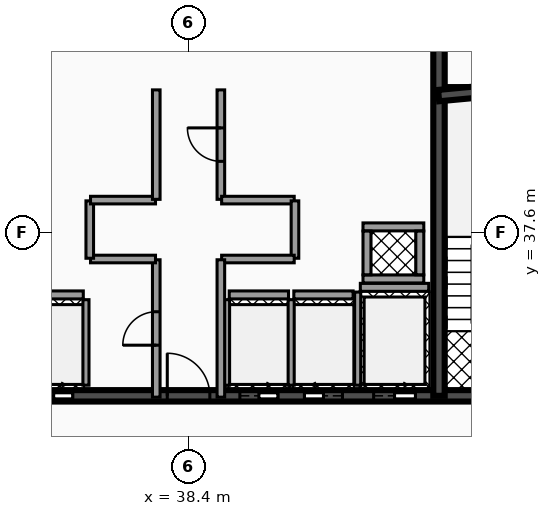
"""IFC4 building model, lengths in metres.
Left out: names, types, materials, properties, quantities, classifications, styles, units other than length and angle.
Written with IfcOpenShell. Run it as: python <this file> out.ifc"""

import sys

from ifc_helpers import new_model, si_unit, direction, frame, frame_2d, origin, place, context, subcontext, project, spatial, rectangle, extrude, element, fill, save


model = new_model("IFC4")
c1 = context("Model", 3, precision=1e-05, world=origin(), true_north=direction((0.0, 1.0)))
c2 = subcontext(c1, "Body", "Model", "MODEL_VIEW")
j1 = project(units=[si_unit("LENGTHUNIT", "METRE"), si_unit("PLANEANGLEUNIT", "RADIAN")], contexts=[c1])
p1 = place(None, origin())
s1 = spatial("IfcSite", under=j1, at=p1, CompositionType="ELEMENT")
p2 = place(p1, origin())
s2 = spatial("IfcBuilding", under=s1, at=p2, CompositionType="ELEMENT")
p3 = place(p2, frame((0.0, 0.0, 272.0)))
s3 = spatial("IfcBuildingStorey", under=s2, at=p3, CompositionType="ELEMENT", Elevation=272.0)
p4 = place(p3, frame((28.5, 33.3, 0.0), z_axis=(0.0, 0.0, 1.0), x_axis=(1.0, 0.0, 0.0)))
e1 = element("IfcWall", 1, at=p4, inside=s3, PredefinedType="SHEAR", context=c2, shape_type="SweptSolid", body=[
    extrude(rectangle(XDim=19.86, YDim=0.3, at=frame_2d((9.93, 0.0))), origin(), (0.0, 0.0, 1.0), 3.18),
])
p5 = place(p4, frame((3.93, 0.0, 0.0)))
e2 = element("IfcOpeningElement", 2, at=p5, cuts=e1, PredefinedType="OPENING", context=c2, shape_type="SweptSolid", body=[
    extrude(rectangle(XDim=1.1, YDim=2.15, at=frame_2d((0.55, 1.075))), frame((0.0, 0.16, 0.0), z_axis=(0.0, -1.0, 0.0), x_axis=(1.0, 0.0, 0.0)), (0.0, 0.0, 1.0), 0.32),
])
p6 = place(p4, frame((14.77, 0.0, 0.0)))
e3 = element("IfcOpeningElement", 3, at=p6, cuts=e1, PredefinedType="OPENING", context=c2, shape_type="SweptSolid", body=[
    extrude(rectangle(XDim=1.1, YDim=2.15, at=frame_2d((0.55, 1.075))), frame((0.0, 0.16, 0.0), z_axis=(0.0, -1.0, 0.0), x_axis=(1.0, 0.0, 0.0)), (0.0, 0.0, 1.0), 0.32),
])
p7 = place(p4, frame((11.25, 0.0, 0.0)))
e4 = element("IfcOpeningElement", 4, at=p7, cuts=e1, PredefinedType="OPENING", context=c2, shape_type="SweptSolid", body=[
    extrude(rectangle(XDim=1.0, YDim=2.1, at=frame_2d((0.5, 1.05))), frame((0.0, 0.16, 0.0), z_axis=(0.0, -1.0, 0.0), x_axis=(1.0, 0.0, 0.0)), (0.0, 0.0, 1.0), 0.32),
])
p8 = place(p4, frame((12.95, 0.0, 0.0)))
e5 = element("IfcOpeningElement", 5, at=p8, cuts=e1, PredefinedType="OPENING", context=c2, shape_type="SweptSolid", body=[
    extrude(rectangle(XDim=1.0, YDim=2.1, at=frame_2d((0.5, 1.05))), frame((0.0, 0.16, 0.0), z_axis=(0.0, -1.0, 0.0), x_axis=(1.0, 0.0, 0.0)), (0.0, 0.0, 1.0), 0.32),
])
p9 = place(p4, frame((5.85, 0.0, 0.0)))
e6 = element("IfcOpeningElement", 6, at=p9, cuts=e1, PredefinedType="OPENING", context=c2, shape_type="SweptSolid", body=[
    extrude(rectangle(XDim=1.0, YDim=2.1, at=frame_2d((0.5, 1.05))), frame((0.0, 0.16, 0.0), z_axis=(0.0, -1.0, 0.0), x_axis=(1.0, 0.0, 0.0)), (0.0, 0.0, 1.0), 0.32),
])
p10 = place(p4, frame((1.21, 0.0, 0.0)))
e7 = element("IfcOpeningElement", 7, at=p10, cuts=e1, PredefinedType="OPENING", context=c2, shape_type="SweptSolid", body=[
    extrude(rectangle(XDim=1.1, YDim=2.2, at=frame_2d((0.55, 1.1))), frame((0.0, 0.16, 0.0), z_axis=(0.0, -1.0, 0.0), x_axis=(1.0, 0.0, 0.0)), (0.0, 0.0, 1.0), 0.32),
])
p11 = place(p4, frame((9.34, 0.0, 0.0)))
e8 = element("IfcOpeningElement", 8, at=p11, cuts=e1, PredefinedType="OPENING", context=c2, shape_type="SweptSolid", body=[
    extrude(rectangle(XDim=1.12, YDim=2.05, at=frame_2d((0.56, 1.025))), frame((0.0, 0.16, 0.0), z_axis=(0.0, -1.0, 0.0), x_axis=(1.0, 0.0, 0.0)), (0.0, 0.0, 1.0), 0.32),
])
p12 = place(p4, frame((17.55, 0.0, 0.0)))
e9 = element("IfcOpeningElement", 9, at=p12, cuts=e1, PredefinedType="OPENING", context=c2, shape_type="SweptSolid", body=[
    extrude(rectangle(XDim=1.1, YDim=2.2, at=frame_2d((0.55, 1.1))), frame((0.0, 0.16, 0.0), z_axis=(0.0, -1.0, 0.0), x_axis=(1.0, 0.0, 0.0)), (0.0, 0.0, 1.0), 0.32),
])
p13 = place(p3, frame((44.99, 33.3, 0.0), z_axis=(0.0, 0.0, 1.0), x_axis=(0.0, 1.0, 0.0)))
e10 = element("IfcWall", 10, at=p13, inside=s3, PredefinedType="SHEAR", context=c2, shape_type="SweptSolid", body=[
    extrude(rectangle(XDim=10.1, YDim=0.3, at=frame_2d((5.05, 0.0))), origin(), (0.0, 0.0, 1.0), 3.18),
])
p14 = place(p3, frame((44.98, 41.2, 0.0), z_axis=(0.0, 0.0, 1.0), x_axis=(0.995686468965, 0.09278176286, 0.0)))
e11 = element("IfcWall", 11, at=p14, inside=s3, PredefinedType="SHEAR", context=c2, shape_type="SweptSolid", body=[
    extrude(rectangle(XDim=3.234, YDim=0.3, at=frame_2d((1.617, 0.0))), origin(), (0.0, 0.0, 1.0), 3.18),
])
p15 = place(p3, frame((42.92, 36.155, 0.0), z_axis=(0.0, 0.0, 1.0), x_axis=(1.0, 0.0, 0.0)))
e12 = element("IfcWall", 12, at=p15, inside=s3, PredefinedType="SOLIDWALL", context=c2, shape_type="SweptSolid", body=[
    extrude(rectangle(XDim=1.8, YDim=0.21, at=frame_2d((0.9, 0.0))), origin(), (0.0, 0.0, 1.0), 3.18),
])
p16 = place(p3, frame((42.85, 33.58, 0.0), z_axis=(0.0, 0.0, 1.0), x_axis=(0.0, 1.0, 0.0)))
e13 = element("IfcWall", 13, at=p16, inside=s3, PredefinedType="SOLIDWALL", context=c2, shape_type="SweptSolid", body=[
    extrude(rectangle(XDim=2.45, YDim=0.16, at=frame_2d((1.225, 0.0))), origin(), (0.0, 0.0, 1.0), 3.18),
])
p17 = place(p3, frame((39.47, 35.955, 0.0), z_axis=(0.0, 0.0, 1.0), x_axis=(1.0, 0.0, 0.0)))
e14 = element("IfcWall", 14, at=p17, inside=s3, PredefinedType="SOLIDWALL", context=c2, shape_type="SweptSolid", body=[
    extrude(rectangle(XDim=1.56, YDim=0.21, at=frame_2d((0.78, 0.0))), origin(), (0.0, 0.0, 1.0), 3.18),
])
for number, where, z_axis, x_axis in (
    (15, (39.4, 33.58, 0.0), (0.0, 0.0, 1.0), (0.0, 1.0, 0.0)),
    (16, (41.1, 33.58, 0.0), (0.0, 0.0, 1.0), (0.0, 1.0, 0.0)),
):
    element("IfcWall", number, at=place(p3, frame(where, z_axis=z_axis, x_axis=x_axis)), inside=s3, PredefinedType="SOLIDWALL", context=c2, shape_type="SweptSolid", body=[
        extrude(rectangle(XDim=2.25, YDim=0.16, at=frame_2d((1.125, 0.0))), origin(), (0.0, 0.0, 1.0), 3.18),
    ])
p18 = place(p3, frame((41.17, 35.955, 0.0), z_axis=(0.0, 0.0, 1.0), x_axis=(1.0, 0.0, 0.0)))
e17 = element("IfcWall", 17, at=p18, inside=s3, PredefinedType="SOLIDWALL", context=c2, shape_type="SweptSolid", body=[
    extrude(rectangle(XDim=1.56, YDim=0.21, at=frame_2d((0.78, 0.0))), origin(), (0.0, 0.0, 1.0), 3.18),
])
p19 = place(p3, frame((34.07, 35.955, 0.0), z_axis=(0.0, 0.0, 1.0), x_axis=(1.0, 0.0, 0.0)))
e18 = element("IfcWall", 18, at=p19, inside=s3, PredefinedType="SOLIDWALL", context=c2, shape_type="SweptSolid", body=[
    extrude(rectangle(XDim=1.56, YDim=0.21, at=frame_2d((0.78, 0.0))), origin(), (0.0, 0.0, 1.0), 3.18),
])
p20 = place(p3, frame((35.7, 33.58, 0.0), z_axis=(0.0, 0.0, 1.0), x_axis=(0.0, 1.0, 0.0)))
e19 = element("IfcWall", 19, at=p20, inside=s3, PredefinedType="SOLIDWALL", context=c2, shape_type="SweptSolid", body=[
    extrude(rectangle(XDim=2.25, YDim=0.16, at=frame_2d((1.125, 0.0))), origin(), (0.0, 0.0, 1.0), 3.18),
])
for number, where, z_axis, x_axis in (
    (20, (42.99, 36.375, 0.0), (0.0, 0.0, 1.0), (1.0, 0.0, 0.0)),
    (21, (42.99, 37.745, 0.0), (0.0, 0.0, 1.0), (1.0, 0.0, 0.0)),
):
    element("IfcWall", number, at=place(p3, frame(where, z_axis=z_axis, x_axis=x_axis)), inside=s3, PredefinedType="SOLIDWALL", context=c2, shape_type="SweptSolid", body=[
        extrude(rectangle(XDim=1.6, YDim=0.21, at=frame_2d((0.8, 0.0))), origin(), (0.0, 0.0, 1.0), 3.18),
    ])
for number, where, z_axis, x_axis in (
    (22, (43.095, 36.485, 0.0), (0.0, 0.0, 1.0), (0.0, 1.0, 0.0)),
    (23, (44.485, 36.485, 0.0), (0.0, 0.0, 1.0), (0.0, 1.0, 0.0)),
):
    element("IfcWall", number, at=place(p3, frame(where, z_axis=z_axis, x_axis=x_axis)), inside=s3, PredefinedType="SOLIDWALL", context=c2, shape_type="SweptSolid", body=[
        extrude(rectangle(XDim=1.15, YDim=0.21, at=frame_2d((0.575, 0.0))), origin(), (0.0, 0.0, 1.0), 3.18),
    ])
p21 = place(p3, frame((37.55, 33.265, 0.0), z_axis=(0.0, 0.0, 1.0), x_axis=(0.0, 1.0, 0.0)))
e24 = element("IfcWall", 24, at=p21, inside=s3, PredefinedType="PARTITIONING", context=c2, shape_type="SweptSolid", body=[
    extrude(rectangle(XDim=3.615, YDim=0.2, at=frame_2d((1.808, 0.0))), origin(), (0.0, 0.0, 1.0), 2.235),
])
p22 = place(p21, frame((1.367, 0.0, 0.0)))
e25 = element("IfcOpeningElement", 25, at=p22, cuts=e24, PredefinedType="OPENING", context=c2, shape_type="SweptSolid", body=[
    extrude(rectangle(XDim=0.88, YDim=2.05, at=frame_2d((0.44, 1.025))), frame((0.0, 0.11, 0.0), z_axis=(0.0, -1.0, 0.0), x_axis=(1.0, 0.0, 0.0)), (0.0, 0.0, 1.0), 0.22),
])
p23 = place(p3, frame((35.82, 36.9, 0.0), z_axis=(0.0, 0.0, 1.0), x_axis=(1.0, 0.0, 0.0)))
e26 = element("IfcWall", 26, at=p23, inside=s3, PredefinedType="PARTITIONING", context=c2, shape_type="SweptSolid", body=[
    extrude(rectangle(XDim=1.71, YDim=0.2, at=frame_2d((0.855, 0.0))), origin(), (0.0, 0.0, 1.0), 2.235),
])
p24 = place(p3, frame((35.8, 36.92, 0.0), z_axis=(0.0, 0.0, 1.0), x_axis=(0.0, 1.0, 0.0)))
e27 = element("IfcWall", 27, at=p24, inside=s3, PredefinedType="PARTITIONING", context=c2, shape_type="SweptSolid", body=[
    extrude(rectangle(XDim=1.51, YDim=0.2, at=frame_2d((0.755, 0.0))), origin(), (0.0, 0.0, 1.0), 2.235),
])
p25 = place(p3, frame((35.82, 38.45, 0.0), z_axis=(0.0, 0.0, 1.0), x_axis=(1.0, 0.0, 0.0)))
e28 = element("IfcWall", 28, at=p25, inside=s3, PredefinedType="PARTITIONING", context=c2, shape_type="SweptSolid", body=[
    extrude(rectangle(XDim=1.71, YDim=0.2, at=frame_2d((0.855, 0.0))), origin(), (0.0, 0.0, 1.0), 2.235),
])
p26 = place(p3, frame((37.55, 38.47, 0.0), z_axis=(0.0, 0.0, 1.0), x_axis=(0.0, 1.0, 0.0)))
e29 = element("IfcWall", 29, at=p26, inside=s3, PredefinedType="PARTITIONING", context=c2, shape_type="SweptSolid", body=[
    extrude(rectangle(XDim=2.88, YDim=0.2, at=frame_2d((1.44, 0.0))), origin(), (0.0, 0.0, 1.0), 2.235),
])
p27 = place(p3, frame((39.25, 38.47, 0.0), z_axis=(0.0, 0.0, 1.0), x_axis=(0.0, 1.0, 0.0)))
e30 = element("IfcWall", 30, at=p27, inside=s3, PredefinedType="PARTITIONING", context=c2, shape_type="SweptSolid", body=[
    extrude(rectangle(XDim=2.88, YDim=0.2, at=frame_2d((1.44, 0.0))), origin(), (0.0, 0.0, 1.0), 2.235),
])
p28 = place(p27, frame((1.0, 0.0, 0.0)))
e31 = element("IfcOpeningElement", 31, at=p28, cuts=e30, PredefinedType="OPENING", context=c2, shape_type="SweptSolid", body=[
    extrude(rectangle(XDim=0.88, YDim=2.05, at=frame_2d((0.44, 1.025))), frame((0.0, 0.11, 0.0), z_axis=(0.0, -1.0, 0.0), x_axis=(1.0, 0.0, 0.0)), (0.0, 0.0, 1.0), 0.22),
])
p29 = place(p3, frame((39.27, 38.45, 0.0), z_axis=(0.0, 0.0, 1.0), x_axis=(1.0, 0.0, 0.0)))
e32 = element("IfcWall", 32, at=p29, inside=s3, PredefinedType="PARTITIONING", context=c2, shape_type="SweptSolid", body=[
    extrude(rectangle(XDim=1.91, YDim=0.2, at=frame_2d((0.955, 0.0))), origin(), (0.0, 0.0, 1.0), 2.235),
])
p30 = place(p3, frame((41.2, 36.92, 0.0), z_axis=(0.0, 0.0, 1.0), x_axis=(0.0, 1.0, 0.0)))
e33 = element("IfcWall", 33, at=p30, inside=s3, PredefinedType="PARTITIONING", context=c2, shape_type="SweptSolid", body=[
    extrude(rectangle(XDim=1.51, YDim=0.2, at=frame_2d((0.755, 0.0))), origin(), (0.0, 0.0, 1.0), 2.235),
])
p31 = place(p3, frame((39.27, 36.9, 0.0), z_axis=(0.0, 0.0, 1.0), x_axis=(1.0, 0.0, 0.0)))
e34 = element("IfcWall", 34, at=p31, inside=s3, PredefinedType="PARTITIONING", context=c2, shape_type="SweptSolid", body=[
    extrude(rectangle(XDim=1.91, YDim=0.2, at=frame_2d((0.955, 0.0))), origin(), (0.0, 0.0, 1.0), 2.235),
])
p32 = place(p3, frame((39.25, 33.265, 0.0), z_axis=(0.0, 0.0, 1.0), x_axis=(0.0, 1.0, 0.0)))
e35 = element("IfcWall", 35, at=p32, inside=s3, PredefinedType="PARTITIONING", context=c2, shape_type="SweptSolid", body=[
    extrude(rectangle(XDim=3.615, YDim=0.2, at=frame_2d((1.808, 0.0))), origin(), (0.0, 0.0, 1.0), 2.235),
])
p33 = place(p6, origin())
e36 = element("IfcDoor", 36, at=p33, inside=s3, OperationType="SLIDING_TO_RIGHT", PredefinedType="DOOR", context=c2, shape_type="SweptSolid", body=[
    extrude(rectangle(XDim=1.1, YDim=2.15, at=frame_2d((0.55, 1.075))), frame((0.0, 0.025, 0.0), z_axis=(0.0, -1.0, 0.0), x_axis=(1.0, 0.0, 0.0)), (0.0, 0.0, 1.0), 0.05),
])
fill(e3, e36)
p34 = place(p7, origin())
e37 = element("IfcDoor", 37, at=p34, inside=s3, OperationType="SLIDING_TO_RIGHT", PredefinedType="DOOR", context=c2, shape_type="SweptSolid", body=[
    extrude(rectangle(XDim=1.0, YDim=2.1, at=frame_2d((0.5, 1.05))), frame((0.0, 0.025, 0.0), z_axis=(0.0, -1.0, 0.0), x_axis=(1.0, 0.0, 0.0)), (0.0, 0.0, 1.0), 0.05),
])
fill(e4, e37)
p35 = place(p8, origin())
e38 = element("IfcDoor", 38, at=p35, inside=s3, OperationType="SLIDING_TO_LEFT", PredefinedType="DOOR", context=c2, shape_type="SweptSolid", body=[
    extrude(rectangle(XDim=1.0, YDim=2.1, at=frame_2d((0.5, 1.05))), frame((0.0, 0.025, 0.0), z_axis=(0.0, -1.0, 0.0), x_axis=(1.0, 0.0, 0.0)), (0.0, 0.0, 1.0), 0.05),
])
fill(e5, e38)
p36 = place(p9, origin())
e39 = element("IfcDoor", 39, at=p36, inside=s3, OperationType="SLIDING_TO_RIGHT", PredefinedType="DOOR", context=c2, shape_type="SweptSolid", body=[
    extrude(rectangle(XDim=1.0, YDim=2.1, at=frame_2d((0.5, 1.05))), frame((0.0, 0.025, 0.0), z_axis=(0.0, -1.0, 0.0), x_axis=(1.0, 0.0, 0.0)), (0.0, 0.0, 1.0), 0.05),
])
fill(e6, e39)
p37 = place(p11, origin())
e40 = element("IfcDoor", 40, at=p37, inside=s3, OperationType="SINGLE_SWING_LEFT", PredefinedType="DOOR", context=c2, shape_type="SweptSolid", body=[
    extrude(rectangle(XDim=1.12, YDim=2.05, at=frame_2d((0.56, 1.025))), frame((0.0, 0.025, 0.0), z_axis=(0.0, -1.0, 0.0), x_axis=(1.0, 0.0, 0.0)), (0.0, 0.0, 1.0), 0.05),
])
fill(e8, e40)
p38 = place(p22, origin())
e41 = element("IfcDoor", 41, at=p38, inside=s3, OperationType="SINGLE_SWING_LEFT", PredefinedType="DOOR", context=c2, shape_type="SweptSolid", body=[
    extrude(rectangle(XDim=0.88, YDim=2.05, at=frame_2d((0.44, 1.025))), frame((0.0, 0.025, 0.0), z_axis=(0.0, -1.0, 0.0), x_axis=(1.0, 0.0, 0.0)), (0.0, 0.0, 1.0), 0.05),
])
fill(e25, e41)
p39 = place(p28, origin())
e42 = element("IfcDoor", 42, at=p39, inside=s3, OperationType="SINGLE_SWING_RIGHT", PredefinedType="DOOR", context=c2, shape_type="SweptSolid", body=[
    extrude(rectangle(XDim=0.88, YDim=2.05, at=frame_2d((0.44, 1.025))), frame((0.0, 0.025, 0.0), z_axis=(0.0, -1.0, 0.0), x_axis=(1.0, 0.0, 0.0)), (0.0, 0.0, 1.0), 0.05),
])
fill(e31, e42)
save(model, sys.argv[1])
